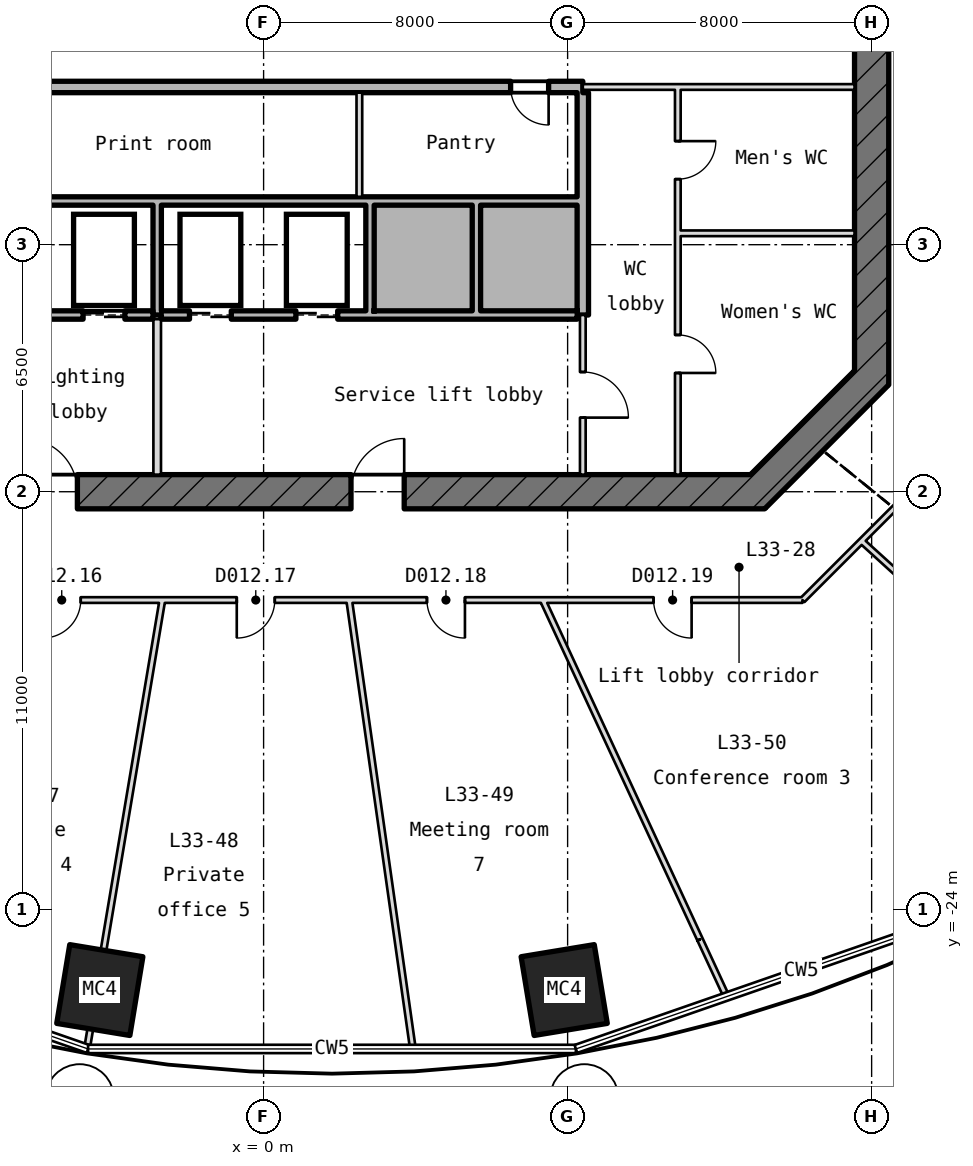
"""IFC4 building model, lengths in metres.
Left out: names, types, materials, properties, quantities, classifications, styles, units other than length and angle.
Written with IfcOpenShell. Run it as: python <this file> out.ifc"""

import sys

from ifc_helpers import new_model, si_unit, direction, frame, frame_2d, origin, origin_2d, place, context, subcontext, project, spatial, rectangle, hollow_rectangle, extrude, element, fill, save


model = new_model("IFC4")
c1 = context("Model", 3, precision=1e-05, world=origin(), true_north=direction((0.0, 1.0)))
c2 = subcontext(c1, "Body", "Model", "MODEL_VIEW")
j1 = project(units=[si_unit("LENGTHUNIT", "METRE"), si_unit("PLANEANGLEUNIT", "RADIAN")], contexts=[c1])
p1 = place(None, origin())
s1 = spatial("IfcSite", under=j1, at=p1, CompositionType="ELEMENT")
p2 = place(p1, origin())
s2 = spatial("IfcBuilding", under=s1, at=p2, CompositionType="ELEMENT")
p3 = place(p2, frame((0.0, 0.0, 155.65)))
s3 = spatial("IfcBuildingStorey", under=s2, at=p3, CompositionType="ELEMENT", Elevation=155.65)
for number, where, z_axis, x_axis in (
    (1, (-4.31, -26.112, -0.25), (0.0, 0.0, 1.0), (-0.987, 0.163, 0.0)),
    (2, (7.91, -26.112, -0.25), (0.0, 0.0, 1.0), (-0.987, -0.163, 0.0)),
):
    element("IfcColumn", number, at=place(p3, frame(where, z_axis=z_axis, x_axis=x_axis)), inside=s3, PredefinedType="COLUMN", context=c2, shape_type="SweptSolid", body=[
        extrude(hollow_rectangle(XDim=1.95, YDim=2.1, WallThickness=0.075, at=origin_2d()), origin(), (0.0, 0.0, 1.0), 5.47),
    ])
p4 = place(p3, frame((12.868, -13.132, -0.25), z_axis=(0.0, 0.0, 1.0), x_axis=(0.707106781187, 0.707106781187, 0.0)))
e3 = element("IfcWall", 3, at=p4, inside=s3, PredefinedType="SHEAR", context=c2, shape_type="SweptSolid", body=[
    extrude(rectangle(XDim=4.615, YDim=0.9, at=frame_2d((2.308, 0.0))), origin(), (0.0, 0.0, 1.0), 5.47),
])
p5 = place(p3, frame((16.0, -10.186, -0.25), z_axis=(0.0, 0.0, 1.0), x_axis=(0.0, 1.0, 0.0)))
e4 = element("IfcWall", 4, at=p5, inside=s3, PredefinedType="SHEAR", context=c2, shape_type="SweptSolid", body=[
    extrude(rectangle(XDim=20.373, YDim=0.9, at=frame_2d((10.186, 0.0))), origin(), (0.0, 0.0, 1.0), 5.47),
])
p6 = place(p5, frame((8.986, 0.0, 0.25)))
e5 = element("IfcOpeningElement", 5, at=p6, cuts=e4, PredefinedType="OPENING", context=c2, shape_type="SweptSolid", body=[
    extrude(rectangle(XDim=2.4, YDim=2.1, at=frame_2d((1.2, 1.05))), frame((0.0, 0.46, 0.0), z_axis=(0.0, -1.0, 0.0), x_axis=(1.0, 0.0, 0.0)), (0.0, 0.0, 1.0), 0.92),
])
p7 = place(p5, frame((13.586, 0.0, 0.25)))
e6 = element("IfcOpeningElement", 6, at=p7, cuts=e4, PredefinedType="OPENING", context=c2, shape_type="SweptSolid", body=[
    extrude(rectangle(XDim=1.2, YDim=2.1, at=frame_2d((0.6, 1.05))), frame((0.0, 0.46, 0.0), z_axis=(0.0, -1.0, 0.0), x_axis=(1.0, 0.0, 0.0)), (0.0, 0.0, 1.0), 0.92),
])
p8 = place(p3, frame((-13.186, -13.0, -0.25), z_axis=(0.0, 0.0, 1.0), x_axis=(1.0, 0.0, 0.0)))
e7 = element("IfcWall", 7, at=p8, inside=s3, PredefinedType="SHEAR", context=c2, shape_type="SweptSolid", body=[
    extrude(rectangle(XDim=26.373, YDim=0.9, at=frame_2d((13.186, 0.0))), origin(), (0.0, 0.0, 1.0), 5.47),
])
p9 = place(p8, frame((2.886, 0.0, 0.25)))
e8 = element("IfcOpeningElement", 8, at=p9, cuts=e7, PredefinedType="OPENING", context=c2, shape_type="SweptSolid", body=[
    extrude(rectangle(XDim=1.2, YDim=2.1, at=frame_2d((0.6, 1.05))), frame((0.0, 0.46, 0.0), z_axis=(0.0, -1.0, 0.0), x_axis=(1.0, 0.0, 0.0)), (0.0, 0.0, 1.0), 0.92),
])
p10 = place(p8, frame((6.886, 0.0, 0.25)))
e9 = element("IfcOpeningElement", 9, at=p10, cuts=e7, PredefinedType="OPENING", context=c2, shape_type="SweptSolid", body=[
    extrude(rectangle(XDim=1.4, YDim=2.1, at=frame_2d((0.7, 1.05))), frame((0.0, 0.46, 0.0), z_axis=(0.0, -1.0, 0.0), x_axis=(1.0, 0.0, 0.0)), (0.0, 0.0, 1.0), 0.92),
])
p11 = place(p8, frame((15.486, 0.0, 0.25)))
e10 = element("IfcOpeningElement", 10, at=p11, cuts=e7, PredefinedType="OPENING", context=c2, shape_type="SweptSolid", body=[
    extrude(rectangle(XDim=1.4, YDim=2.1, at=frame_2d((0.7, 1.05))), frame((0.0, 0.46, 0.0), z_axis=(0.0, -1.0, 0.0), x_axis=(1.0, 0.0, 0.0)), (0.0, 0.0, 1.0), 0.92),
])
p12 = place(p3, frame((-8.25, -8.35, 0.0), z_axis=(0.0, 0.0, 1.0), x_axis=(1.0, 0.0, 0.0)))
e11 = element("IfcWall", 11, at=p12, inside=s3, PredefinedType="STANDARD", context=c2, shape_type="SweptSolid", body=[
    extrude(rectangle(XDim=5.34, YDim=0.22, at=frame_2d((2.67, 0.0))), origin(), (0.0, 0.0, 1.0), 5.22),
])
p13 = place(p12, frame((0.7, 0.0, 0.0)))
e12 = element("IfcOpeningElement", 12, at=p13, cuts=e11, PredefinedType="OPENING", context=c2, shape_type="SweptSolid", body=[
    extrude(rectangle(XDim=1.1, YDim=2.1, at=frame_2d((0.55, 1.05))), frame((0.0, 0.12, 0.0), z_axis=(0.0, -1.0, 0.0), x_axis=(1.0, 0.0, 0.0)), (0.0, 0.0, 1.0), 0.24),
])
p14 = place(p12, frame((3.5, 0.0, 0.0)))
e13 = element("IfcOpeningElement", 13, at=p14, cuts=e11, PredefinedType="OPENING", context=c2, shape_type="SweptSolid", body=[
    extrude(rectangle(XDim=1.1, YDim=2.1, at=frame_2d((0.55, 1.05))), frame((0.0, 0.12, 0.0), z_axis=(0.0, -1.0, 0.0), x_axis=(1.0, 0.0, 0.0)), (0.0, 0.0, 1.0), 0.24),
])
p15 = place(p3, frame((-2.69, -8.35, 0.0), z_axis=(0.0, 0.0, 1.0), x_axis=(1.0, 0.0, 0.0)))
e14 = element("IfcWall", 14, at=p15, inside=s3, PredefinedType="STANDARD", context=c2, shape_type="SweptSolid", body=[
    extrude(rectangle(XDim=10.94, YDim=0.22, at=frame_2d((5.47, 0.0))), origin(), (0.0, 0.0, 1.0), 5.22),
])
p16 = place(p15, frame((0.74, 0.0, 0.0)))
e15 = element("IfcOpeningElement", 15, at=p16, cuts=e14, PredefinedType="OPENING", context=c2, shape_type="SweptSolid", body=[
    extrude(rectangle(XDim=1.1, YDim=2.1, at=frame_2d((0.55, 1.05))), frame((0.0, 0.12, 0.0), z_axis=(0.0, -1.0, 0.0), x_axis=(1.0, 0.0, 0.0)), (0.0, 0.0, 1.0), 0.24),
])
p17 = place(p15, frame((3.54, 0.0, 0.0)))
e16 = element("IfcOpeningElement", 16, at=p17, cuts=e14, PredefinedType="OPENING", context=c2, shape_type="SweptSolid", body=[
    extrude(rectangle(XDim=1.1, YDim=2.1, at=frame_2d((0.55, 1.05))), frame((0.0, 0.12, 0.0), z_axis=(0.0, -1.0, 0.0), x_axis=(1.0, 0.0, 0.0)), (0.0, 0.0, 1.0), 0.24),
])
p18 = place(p3, frame((10.975, -6.2, 0.0), z_axis=(0.0, 0.0, 1.0), x_axis=(1.0, 0.0, 0.0)))
e17 = element("IfcWall", 17, at=p18, inside=s3, PredefinedType="PARTITIONING", context=c2, shape_type="SweptSolid", body=[
    extrude(rectangle(XDim=4.575, YDim=0.15, at=frame_2d((2.288, 0.0))), origin(), (0.0, 0.0, 1.0), 5.22),
])
p19 = place(p3, frame((-8.25, -5.35, 0.0), z_axis=(0.0, 0.0, 1.0), x_axis=(1.0, 0.0, 0.0)))
e18 = element("IfcWall", 18, at=p19, inside=s3, PredefinedType="STANDARD", context=c2, shape_type="SweptSolid", body=[
    extrude(rectangle(XDim=16.5, YDim=0.22, at=frame_2d((8.25, 0.0))), origin(), (0.0, 0.0, 1.0), 5.22),
])
p20 = place(p3, frame((-8.4, -2.35, -0.25), z_axis=(0.0, 0.0, 1.0), x_axis=(1.0, 0.0, 0.0)))
e19 = element("IfcWall", 19, at=p20, inside=s3, PredefinedType="SHEAR", context=c2, shape_type="SweptSolid", body=[
    extrude(rectangle(XDim=16.8, YDim=0.3, at=frame_2d((8.4, 0.0))), origin(), (0.0, 0.0, 1.0), 5.47),
])
p21 = place(p20, frame((0.9, 0.0, 0.25)))
e20 = element("IfcOpeningElement", 20, at=p21, cuts=e19, PredefinedType="OPENING", context=c2, shape_type="SweptSolid", body=[
    extrude(rectangle(XDim=1.0, YDim=2.1, at=frame_2d((0.5, 1.05))), frame((0.0, 0.16, 0.0), z_axis=(0.0, -1.0, 0.0), x_axis=(1.0, 0.0, 0.0)), (0.0, 0.0, 1.0), 0.32),
])
p22 = place(p20, frame((14.9, 0.0, 0.25)))
e21 = element("IfcOpeningElement", 21, at=p22, cuts=e19, PredefinedType="OPENING", context=c2, shape_type="SweptSolid", body=[
    extrude(rectangle(XDim=1.0, YDim=2.1, at=frame_2d((0.5, 1.05))), frame((0.0, 0.16, 0.0), z_axis=(0.0, -1.0, 0.0), x_axis=(1.0, 0.0, 0.0)), (0.0, 0.0, 1.0), 0.32),
])
p23 = place(p3, frame((8.4, -2.35, 0.0), z_axis=(0.0, 0.0, 1.0), x_axis=(1.0, 0.0, 0.0)))
e22 = element("IfcWall", 22, at=p23, inside=s3, PredefinedType="PARTITIONING", context=c2, shape_type="SweptSolid", body=[
    extrude(rectangle(XDim=7.15, YDim=0.15, at=frame_2d((3.575, 0.0))), origin(), (0.0, 0.0, 1.0), 5.22),
])
p24 = place(p3, frame((-2.8, -12.55, 0.0), z_axis=(0.0, 0.0, 1.0), x_axis=(0.0, 1.0, 0.0)))
e23 = element("IfcWall", 23, at=p24, inside=s3, PredefinedType="PARTITIONING", context=c2, shape_type="SweptSolid", body=[
    extrude(rectangle(XDim=4.09, YDim=0.2, at=frame_2d((2.045, 0.0))), origin(), (0.0, 0.0, 1.0), 5.22),
])
p25 = place(p3, frame((-2.8, -8.35, 0.0), z_axis=(0.0, 0.0, 1.0), x_axis=(0.0, 1.0, 0.0)))
e24 = element("IfcWall", 24, at=p25, inside=s3, PredefinedType="STANDARD", context=c2, shape_type="SweptSolid", body=[
    extrude(rectangle(XDim=2.89, YDim=0.22, at=frame_2d((1.445, 0.0))), origin(), (0.0, 0.0, 1.0), 5.22),
])
p26 = place(p3, frame((2.52, -5.24, 0.0), z_axis=(0.0, 0.0, 1.0), x_axis=(0.0, 1.0, 0.0)))
e25 = element("IfcWall", 25, at=p26, inside=s3, PredefinedType="PARTITIONING", context=c2, shape_type="SweptSolid", body=[
    extrude(rectangle(XDim=2.74, YDim=0.15, at=frame_2d((1.37, 0.0))), origin(), (0.0, 0.0, 1.0), 5.22),
])
for number, where, z_axis, x_axis in (
    (26, (2.8, -8.24, 0.0), (0.0, 0.0, 1.0), (0.0, 1.0, 0.0)),
    (27, (5.6, -8.24, 0.0), (0.0, 0.0, 1.0), (0.0, 1.0, 0.0)),
):
    element("IfcWall", number, at=place(p3, frame(where, z_axis=z_axis, x_axis=x_axis)), inside=s3, PredefinedType="STANDARD", context=c2, shape_type="SweptSolid", body=[
        extrude(rectangle(XDim=2.78, YDim=0.22, at=frame_2d((1.39, 0.0))), origin(), (0.0, 0.0, 1.0), 5.22),
    ])
p27 = place(p3, frame((8.4, -12.55, 0.0), z_axis=(0.0, 0.0, 1.0), x_axis=(0.0, 1.0, 0.0)))
e28 = element("IfcWall", 28, at=p27, inside=s3, PredefinedType="PARTITIONING", context=c2, shape_type="SweptSolid", body=[
    extrude(rectangle(XDim=4.2, YDim=0.15, at=frame_2d((2.1, 0.0))), origin(), (0.0, 0.0, 1.0), 5.22),
])
p28 = place(p27, frame((1.5, 0.0, 0.0)))
e29 = element("IfcOpeningElement", 29, at=p28, cuts=e28, PredefinedType="OPENING", context=c2, shape_type="SweptSolid", body=[
    extrude(rectangle(XDim=1.2, YDim=2.1, at=frame_2d((0.6, 1.05))), frame((0.0, 0.085, 0.0), z_axis=(0.0, -1.0, 0.0), x_axis=(1.0, 0.0, 0.0)), (0.0, 0.0, 1.0), 0.17),
])
p29 = place(p3, frame((8.4, -8.35, -0.25), z_axis=(0.0, 0.0, 1.0), x_axis=(0.0, 1.0, 0.0)))
e30 = element("IfcWall", 30, at=p29, inside=s3, PredefinedType="SHEAR", context=c2, shape_type="SweptSolid", body=[
    extrude(rectangle(XDim=5.85, YDim=0.3, at=frame_2d((2.925, 0.0))), origin(), (0.0, 0.0, 1.0), 5.47),
])
p30 = place(p3, frame((10.9, -12.55, 0.0), z_axis=(0.0, 0.0, 1.0), x_axis=(0.0, 1.0, 0.0)))
e31 = element("IfcWall", 31, at=p30, inside=s3, PredefinedType="PARTITIONING", context=c2, shape_type="SweptSolid", body=[
    extrude(rectangle(XDim=10.125, YDim=0.15, at=frame_2d((5.062, 0.0))), origin(), (0.0, 0.0, 1.0), 5.22),
])
p31 = place(p30, frame((7.775, 0.0, 0.0)))
e32 = element("IfcOpeningElement", 32, at=p31, cuts=e31, PredefinedType="OPENING", context=c2, shape_type="SweptSolid", body=[
    extrude(rectangle(XDim=1.0, YDim=2.1, at=frame_2d((0.5, 1.05))), frame((0.0, 0.085, 0.0), z_axis=(0.0, -1.0, 0.0), x_axis=(1.0, 0.0, 0.0)), (0.0, 0.0, 1.0), 0.17),
])
p32 = place(p30, frame((2.675, 0.0, 0.0)))
e33 = element("IfcOpeningElement", 33, at=p32, cuts=e31, PredefinedType="OPENING", context=c2, shape_type="SweptSolid", body=[
    extrude(rectangle(XDim=1.0, YDim=2.1, at=frame_2d((0.5, 1.05))), frame((0.0, 0.085, 0.0), z_axis=(0.0, -1.0, 0.0), x_axis=(1.0, 0.0, 0.0)), (0.0, 0.0, 1.0), 0.17),
])
p33 = place(p3, frame((-14.18, -15.85, 0.0), z_axis=(0.0, 0.0, 1.0), x_axis=(1.0, 0.0, 0.0)))
e34 = element("IfcWall", 34, at=p33, inside=s3, PredefinedType="PARTITIONING", context=c2, shape_type="SweptSolid", body=[
    extrude(rectangle(XDim=28.361, YDim=0.15, at=frame_2d((14.18, 0.0))), origin(), (0.0, 0.0, 1.0), 5.22),
])
p34 = place(p33, frame((2.61, 0.0, 0.0)))
e35 = element("IfcOpeningElement", 35, at=p34, cuts=e34, PredefinedType="OPENING", context=c2, shape_type="SweptSolid", body=[
    extrude(rectangle(XDim=1.0, YDim=2.1, at=frame_2d((0.5, 1.05))), frame((0.0, 0.085, 0.0), z_axis=(0.0, -1.0, 0.0), x_axis=(1.0, 0.0, 0.0)), (0.0, 0.0, 1.0), 0.17),
])
p35 = place(p33, frame((8.368, 0.0, 0.0)))
e36 = element("IfcOpeningElement", 36, at=p35, cuts=e34, PredefinedType="OPENING", context=c2, shape_type="SweptSolid", body=[
    extrude(rectangle(XDim=1.0, YDim=2.1, at=frame_2d((0.5, 1.05))), frame((0.0, 0.085, 0.0), z_axis=(0.0, -1.0, 0.0), x_axis=(1.0, 0.0, 0.0)), (0.0, 0.0, 1.0), 0.17),
])
p36 = place(p33, frame((13.475, 0.0, 0.0)))
e37 = element("IfcOpeningElement", 37, at=p36, cuts=e34, PredefinedType="OPENING", context=c2, shape_type="SweptSolid", body=[
    extrude(rectangle(XDim=1.0, YDim=2.1, at=frame_2d((0.5, 1.05))), frame((0.0, 0.085, 0.0), z_axis=(0.0, -1.0, 0.0), x_axis=(1.0, 0.0, 0.0)), (0.0, 0.0, 1.0), 0.17),
])
p37 = place(p33, frame((18.479, 0.0, 0.0)))
e38 = element("IfcOpeningElement", 38, at=p37, cuts=e34, PredefinedType="OPENING", context=c2, shape_type="SweptSolid", body=[
    extrude(rectangle(XDim=1.0, YDim=2.1, at=frame_2d((0.5, 1.05))), frame((0.0, 0.085, 0.0), z_axis=(0.0, -1.0, 0.0), x_axis=(1.0, 0.0, 0.0)), (0.0, 0.0, 1.0), 0.17),
])
p38 = place(p33, frame((24.443, 0.0, 0.0)))
e39 = element("IfcOpeningElement", 39, at=p38, cuts=e34, PredefinedType="OPENING", context=c2, shape_type="SweptSolid", body=[
    extrude(rectangle(XDim=1.0, YDim=2.1, at=frame_2d((0.5, 1.05))), frame((0.0, 0.085, 0.0), z_axis=(0.0, -1.0, 0.0), x_axis=(1.0, 0.0, 0.0)), (0.0, 0.0, 1.0), 0.17),
])
p39 = place(p3, frame((14.18, -15.85, 0.0), z_axis=(0.0, 0.0, 1.0), x_axis=(0.707106781187, 0.707106781187, 0.0)))
e40 = element("IfcWall", 40, at=p39, inside=s3, PredefinedType="PARTITIONING", context=c2, shape_type="SweptSolid", body=[
    extrude(rectangle(XDim=6.604, YDim=0.15, at=frame_2d((3.302, 0.0))), origin(), (0.0, 0.0, 1.0), 5.22),
])
p40 = place(p39, frame((4.506, 0.0, 0.0)))
e41 = element("IfcOpeningElement", 41, at=p40, cuts=e40, PredefinedType="OPENING", context=c2, shape_type="SweptSolid", body=[
    extrude(rectangle(XDim=1.0, YDim=2.1, at=frame_2d((0.5, 1.05))), frame((0.0, 0.085, 0.0), z_axis=(0.0, -1.0, 0.0), x_axis=(1.0, 0.0, 0.0)), (0.0, 0.0, 1.0), 0.17),
])
p41 = place(p3, frame((-4.643, -27.632, 0.0), z_axis=(0.0, 0.0, 1.0), x_axis=(0.16573510633, 0.986170307062, 0.0)))
e42 = element("IfcWall", 42, at=p41, inside=s3, PredefinedType="PARTITIONING", context=c2, shape_type="SweptSolid", body=[
    extrude(rectangle(XDim=2.104, YDim=0.15, at=frame_2d((1.052, 0.0))), origin(), (0.0, 0.0, 1.0), 5.22),
])
p42 = place(p3, frame((-4.295, -25.557, 0.0), z_axis=(0.0, 0.0, 1.0), x_axis=(0.165706005705, 0.986175197251, 0.0)))
e43 = element("IfcWall", 43, at=p42, inside=s3, PredefinedType="PARTITIONING", context=c2, shape_type="SweptSolid", body=[
    extrude(rectangle(XDim=9.843, YDim=0.15, at=frame_2d((4.922, 0.0))), origin(), (0.0, 0.0, 1.0), 4.608),
])
p43 = place(p3, frame((3.927, -27.642, 0.0), z_axis=(0.0, 0.0, 1.0), x_axis=(-0.140640726518, 0.990060698162, 0.0)))
e44 = element("IfcWall", 44, at=p43, inside=s3, PredefinedType="PARTITIONING", context=c2, shape_type="SweptSolid", body=[
    extrude(rectangle(XDim=11.91, YDim=0.15, at=frame_2d((5.955, 0.0))), origin(), (0.0, 0.0, 1.0), 5.22),
])
p44 = place(p3, frame((12.172, -26.267, 0.0), z_axis=(0.0, 0.0, 1.0), x_axis=(-0.420455033989, 0.907313377171, 0.0)))
e45 = element("IfcWall", 45, at=p44, inside=s3, PredefinedType="PARTITIONING", context=c2, shape_type="SweptSolid", body=[
    extrude(rectangle(XDim=1.64, YDim=0.15, at=frame_2d((0.82, 0.0))), origin(), (0.0, 0.0, 1.0), 5.22),
])
p45 = place(p3, frame((11.483, -24.779, 0.0), z_axis=(0.0, 0.0, 1.0), x_axis=(-0.420442084923, 0.907319377742, 0.0)))
e46 = element("IfcWall", 46, at=p45, inside=s3, PredefinedType="PARTITIONING", context=c2, shape_type="SweptSolid", body=[
    extrude(rectangle(XDim=9.841, YDim=0.15, at=frame_2d((4.921, 0.0))), origin(), (0.0, 0.0, 1.0), 4.676),
])
p46 = place(p3, frame((23.096, -20.984, 0.0), z_axis=(0.0, 0.0, 1.0), x_axis=(-0.740122200338, 0.672472399856, 0.0)))
e47 = element("IfcWall", 47, at=p46, inside=s3, PredefinedType="PARTITIONING", context=c2, shape_type="SweptSolid", body=[
    extrude(rectangle(XDim=9.946, YDim=0.15, at=frame_2d((4.973, 0.0))), origin(), (0.0, 0.0, 1.0), 5.22),
])
p47 = place(p14, origin())
e48 = element("IfcDoor", 48, at=p47, inside=s3, OperationType="DOUBLE_DOOR_SLIDING", PredefinedType="DOOR", context=c2, shape_type="SweptSolid", body=[
    extrude(rectangle(XDim=1.1, YDim=2.1, at=frame_2d((0.55, 1.05))), frame((0.0, 0.025, 0.0), z_axis=(0.0, -1.0, 0.0), x_axis=(1.0, 0.0, 0.0)), (0.0, 0.0, 1.0), 0.05),
])
fill(e13, e48)
p48 = place(p16, origin())
e49 = element("IfcDoor", 49, at=p48, inside=s3, OperationType="DOUBLE_DOOR_SLIDING", PredefinedType="DOOR", context=c2, shape_type="SweptSolid", body=[
    extrude(rectangle(XDim=1.1, YDim=2.1, at=frame_2d((0.55, 1.05))), frame((0.0, 0.025, 0.0), z_axis=(0.0, -1.0, 0.0), x_axis=(1.0, 0.0, 0.0)), (0.0, 0.0, 1.0), 0.05),
])
fill(e15, e49)
p49 = place(p17, origin())
e50 = element("IfcDoor", 50, at=p49, inside=s3, OperationType="DOUBLE_DOOR_SLIDING", PredefinedType="DOOR", context=c2, shape_type="SweptSolid", body=[
    extrude(rectangle(XDim=1.1, YDim=2.1, at=frame_2d((0.55, 1.05))), frame((0.0, 0.025, 0.0), z_axis=(0.0, -1.0, 0.0), x_axis=(1.0, 0.0, 0.0)), (0.0, 0.0, 1.0), 0.05),
])
fill(e16, e50)
p50 = place(p10, origin())
e51 = element("IfcDoor", 51, at=p50, inside=s3, OperationType="SINGLE_SWING_RIGHT", PredefinedType="DOOR", context=c2, shape_type="SweptSolid", body=[
    extrude(rectangle(XDim=1.4, YDim=2.1, at=frame_2d((0.7, 1.05))), frame((0.0, 0.025, 0.0), z_axis=(0.0, -1.0, 0.0), x_axis=(1.0, 0.0, 0.0)), (0.0, 0.0, 1.0), 0.05),
])
fill(e9, e51)
p51 = place(p11, origin())
e52 = element("IfcDoor", 52, at=p51, inside=s3, OperationType="SINGLE_SWING_RIGHT", PredefinedType="DOOR", context=c2, shape_type="SweptSolid", body=[
    extrude(rectangle(XDim=1.4, YDim=2.1, at=frame_2d((0.7, 1.05))), frame((0.0, 0.025, 0.0), z_axis=(0.0, -1.0, 0.0), x_axis=(1.0, 0.0, 0.0)), (0.0, 0.0, 1.0), 0.05),
])
fill(e10, e52)
p52 = place(p22, frame((1.0, 0.0, 0.0), z_axis=(0.0, 0.0, 1.0), x_axis=(-1.0, 0.0, 0.0)))
e53 = element("IfcDoor", 53, at=p52, inside=s3, OperationType="SINGLE_SWING_LEFT", PredefinedType="DOOR", context=c2, shape_type="SweptSolid", body=[
    extrude(rectangle(XDim=1.0, YDim=2.1, at=frame_2d((0.5, 1.05))), frame((0.0, 0.025, 0.0), z_axis=(0.0, -1.0, 0.0), x_axis=(1.0, 0.0, 0.0)), (0.0, 0.0, 1.0), 0.05),
])
fill(e21, e53)
p53 = place(p28, frame((1.2, 0.0, 0.0), z_axis=(0.0, 0.0, 1.0), x_axis=(-1.0, 0.0, 0.0)))
e54 = element("IfcDoor", 54, at=p53, inside=s3, OperationType="SINGLE_SWING_LEFT", PredefinedType="DOOR", context=c2, shape_type="SweptSolid", body=[
    extrude(rectangle(XDim=1.2, YDim=2.1, at=frame_2d((0.6, 1.05))), frame((0.0, 0.025, 0.0), z_axis=(0.0, -1.0, 0.0), x_axis=(1.0, 0.0, 0.0)), (0.0, 0.0, 1.0), 0.05),
])
fill(e29, e54)
p54 = place(p31, frame((1.0, 0.0, 0.0), z_axis=(0.0, 0.0, 1.0), x_axis=(-1.0, 0.0, 0.0)))
e55 = element("IfcDoor", 55, at=p54, inside=s3, OperationType="SINGLE_SWING_LEFT", PredefinedType="DOOR", context=c2, shape_type="SweptSolid", body=[
    extrude(rectangle(XDim=1.0, YDim=2.1, at=frame_2d((0.5, 1.05))), frame((0.0, 0.025, 0.0), z_axis=(0.0, -1.0, 0.0), x_axis=(1.0, 0.0, 0.0)), (0.0, 0.0, 1.0), 0.05),
])
fill(e32, e55)
p55 = place(p32, frame((1.0, 0.0, 0.0), z_axis=(0.0, 0.0, 1.0), x_axis=(-1.0, 0.0, 0.0)))
e56 = element("IfcDoor", 56, at=p55, inside=s3, OperationType="SINGLE_SWING_LEFT", PredefinedType="DOOR", context=c2, shape_type="SweptSolid", body=[
    extrude(rectangle(XDim=1.0, YDim=2.1, at=frame_2d((0.5, 1.05))), frame((0.0, 0.025, 0.0), z_axis=(0.0, -1.0, 0.0), x_axis=(1.0, 0.0, 0.0)), (0.0, 0.0, 1.0), 0.05),
])
fill(e33, e56)
p56 = place(p35, frame((1.0, 0.0, 0.0), z_axis=(0.0, 0.0, 1.0), x_axis=(-1.0, 0.0, 0.0)))
e57 = element("IfcDoor", 57, at=p56, inside=s3, OperationType="SINGLE_SWING_LEFT", PredefinedType="DOOR", context=c2, shape_type="SweptSolid", body=[
    extrude(rectangle(XDim=1.0, YDim=2.1, at=frame_2d((0.5, 1.05))), frame((0.0, 0.025, 0.0), z_axis=(0.0, -1.0, 0.0), x_axis=(1.0, 0.0, 0.0)), (0.0, 0.0, 1.0), 0.05),
])
fill(e36, e57)
p57 = place(p36, frame((1.0, 0.0, 0.0), z_axis=(0.0, 0.0, 1.0), x_axis=(-1.0, 0.0, 0.0)))
e58 = element("IfcDoor", 58, at=p57, inside=s3, OperationType="SINGLE_SWING_LEFT", PredefinedType="DOOR", context=c2, shape_type="SweptSolid", body=[
    extrude(rectangle(XDim=1.0, YDim=2.1, at=frame_2d((0.5, 1.05))), frame((0.0, 0.025, 0.0), z_axis=(0.0, -1.0, 0.0), x_axis=(1.0, 0.0, 0.0)), (0.0, 0.0, 1.0), 0.05),
])
fill(e37, e58)
p58 = place(p37, frame((1.0, 0.0, 0.0), z_axis=(0.0, 0.0, 1.0), x_axis=(-1.0, 0.0, 0.0)))
e59 = element("IfcDoor", 59, at=p58, inside=s3, OperationType="SINGLE_SWING_LEFT", PredefinedType="DOOR", context=c2, shape_type="SweptSolid", body=[
    extrude(rectangle(XDim=1.0, YDim=2.1, at=frame_2d((0.5, 1.05))), frame((0.0, 0.025, 0.0), z_axis=(0.0, -1.0, 0.0), x_axis=(1.0, 0.0, 0.0)), (0.0, 0.0, 1.0), 0.05),
])
fill(e38, e59)
p59 = place(p38, frame((1.0, 0.0, 0.0), z_axis=(0.0, 0.0, 1.0), x_axis=(-1.0, 0.0, 0.0)))
e60 = element("IfcDoor", 60, at=p59, inside=s3, OperationType="SINGLE_SWING_LEFT", PredefinedType="DOOR", context=c2, shape_type="SweptSolid", body=[
    extrude(rectangle(XDim=1.0, YDim=2.1, at=frame_2d((0.5, 1.05))), frame((0.0, 0.025, 0.0), z_axis=(0.0, -1.0, 0.0), x_axis=(1.0, 0.0, 0.0)), (0.0, 0.0, 1.0), 0.05),
])
fill(e39, e60)
save(model, sys.argv[1])
